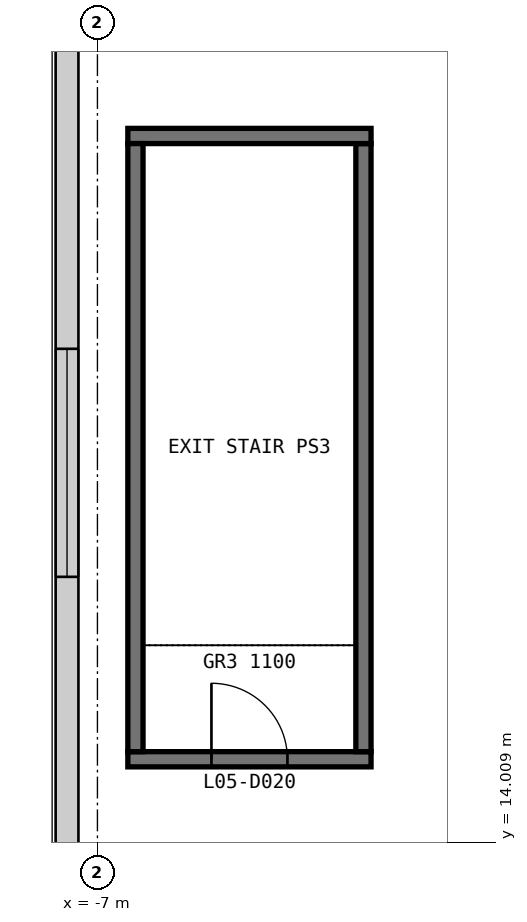
"""IFC4 building model, lengths in metres.
Left out: names, types, materials, properties, quantities, classifications, styles, units other than length and angle.
Written with IfcOpenShell. Run it as: python <this file> out.ifc"""

import sys

from ifc_helpers import new_model, si_unit, direction, frame, frame_2d, origin, place, context, subcontext, project, spatial, rectangle, extrude, element, fill, save


model = new_model("IFC4")
c1 = context("Model", 3, precision=1e-05, world=origin(), true_north=direction((0.0, 1.0)))
c2 = subcontext(c1, "Body", "Model", "MODEL_VIEW")
j1 = project(units=[si_unit("LENGTHUNIT", "METRE"), si_unit("PLANEANGLEUNIT", "RADIAN")], contexts=[c1])
p1 = place(None, origin())
s1 = spatial("IfcSite", under=j1, at=p1, CompositionType="ELEMENT")
p2 = place(p1, origin())
s2 = spatial("IfcBuilding", under=s1, at=p2, CompositionType="ELEMENT")
p3 = place(p2, frame((0.0, 0.0, 26.2)))
s3 = spatial("IfcBuildingStorey", under=s2, at=p3, CompositionType="ELEMENT", Elevation=26.2)
p4 = place(p3, frame((-7.4, 65.25, 0.0), z_axis=(0.0, 0.0, 1.0), x_axis=(0.0, -1.0, 0.0)))
e1 = element("IfcWall", 1, at=p4, inside=s3, PredefinedType="SOLIDWALL", context=c2, shape_type="SweptSolid", body=[
    extrude(rectangle(XDim=72.5, YDim=0.3, at=frame_2d((36.25, 0.0))), origin(), (0.0, 0.0, 1.0), 4.5),
])
p5 = place(p4, frame((66.75, 0.0, 0.9)))
e2 = element("IfcOpeningElement", 2, at=p5, cuts=e1, PredefinedType="OPENING", context=c2, shape_type="SweptSolid", body=[
    extrude(rectangle(XDim=3.0, YDim=2.4, at=frame_2d((1.5, 1.2))), frame((0.0, 0.16, 0.0), z_axis=(0.0, -1.0, 0.0), x_axis=(1.0, 0.0, 0.0)), (0.0, 0.0, 1.0), 0.32),
])
p6 = place(p4, frame((58.75, 0.0, 0.9)))
e3 = element("IfcOpeningElement", 3, at=p6, cuts=e1, PredefinedType="OPENING", context=c2, shape_type="SweptSolid", body=[
    extrude(rectangle(XDim=3.0, YDim=2.4, at=frame_2d((1.5, 1.2))), frame((0.0, 0.16, 0.0), z_axis=(0.0, -1.0, 0.0), x_axis=(1.0, 0.0, 0.0)), (0.0, 0.0, 1.0), 0.32),
])
p7 = place(p4, frame((44.75, 0.0, 0.9)))
e4 = element("IfcOpeningElement", 4, at=p7, cuts=e1, PredefinedType="OPENING", context=c2, shape_type="SweptSolid", body=[
    extrude(rectangle(XDim=3.0, YDim=2.4, at=frame_2d((1.5, 1.2))), frame((0.0, 0.16, 0.0), z_axis=(0.0, -1.0, 0.0), x_axis=(1.0, 0.0, 0.0)), (0.0, 0.0, 1.0), 0.32),
])
p8 = place(p4, frame((32.75, 0.0, 0.9)))
e5 = element("IfcOpeningElement", 5, at=p8, cuts=e1, PredefinedType="OPENING", context=c2, shape_type="SweptSolid", body=[
    extrude(rectangle(XDim=3.0, YDim=2.4, at=frame_2d((1.5, 1.2))), frame((0.0, 0.16, 0.0), z_axis=(0.0, -1.0, 0.0), x_axis=(1.0, 0.0, 0.0)), (0.0, 0.0, 1.0), 0.32),
])
p9 = place(p4, frame((24.25, 0.0, 0.9)))
e6 = element("IfcOpeningElement", 6, at=p9, cuts=e1, PredefinedType="OPENING", context=c2, shape_type="SweptSolid", body=[
    extrude(rectangle(XDim=3.0, YDim=2.4, at=frame_2d((1.5, 1.2))), frame((0.0, 0.16, 0.0), z_axis=(0.0, -1.0, 0.0), x_axis=(1.0, 0.0, 0.0)), (0.0, 0.0, 1.0), 0.32),
])
p10 = place(p4, frame((18.25, 0.0, 0.9)))
e7 = element("IfcOpeningElement", 7, at=p10, cuts=e1, PredefinedType="OPENING", context=c2, shape_type="SweptSolid", body=[
    extrude(rectangle(XDim=3.0, YDim=2.4, at=frame_2d((1.5, 1.2))), frame((0.0, 0.16, 0.0), z_axis=(0.0, -1.0, 0.0), x_axis=(1.0, 0.0, 0.0)), (0.0, 0.0, 1.0), 0.32),
])
p11 = place(p4, frame((10.75, 0.0, 0.9)))
e8 = element("IfcOpeningElement", 8, at=p11, cuts=e1, PredefinedType="OPENING", context=c2, shape_type="SweptSolid", body=[
    extrude(rectangle(XDim=3.0, YDim=2.4, at=frame_2d((1.5, 1.2))), frame((0.0, 0.16, 0.0), z_axis=(0.0, -1.0, 0.0), x_axis=(1.0, 0.0, 0.0)), (0.0, 0.0, 1.0), 0.32),
])
p12 = place(p4, frame((2.75, 0.0, 0.9)))
e9 = element("IfcOpeningElement", 9, at=p12, cuts=e1, PredefinedType="OPENING", context=c2, shape_type="SweptSolid", body=[
    extrude(rectangle(XDim=3.0, YDim=2.4, at=frame_2d((1.5, 1.2))), frame((0.0, 0.16, 0.0), z_axis=(0.0, -1.0, 0.0), x_axis=(1.0, 0.0, 0.0)), (0.0, 0.0, 1.0), 0.32),
])
p13 = place(p3, frame((-6.6, 15.1, 0.0), z_axis=(0.0, 0.0, 1.0), x_axis=(1.0, 0.0, 0.0)))
e10 = element("IfcWall", 10, at=p13, inside=s3, PredefinedType="SOLIDWALL", context=c2, shape_type="SweptSolid", body=[
    extrude(rectangle(XDim=3.2, YDim=0.2, at=frame_2d((1.6, 0.0))), origin(), (0.0, 0.0, 1.0), 4.8),
])
p14 = place(p13, frame((1.1, 0.0, 0.0)))
e11 = element("IfcOpeningElement", 11, at=p14, cuts=e10, PredefinedType="OPENING", context=c2, shape_type="SweptSolid", body=[
    extrude(rectangle(XDim=1.0, YDim=2.2, at=frame_2d((0.5, 1.1))), frame((0.0, 0.11, 0.0), z_axis=(0.0, -1.0, 0.0), x_axis=(1.0, 0.0, 0.0)), (0.0, 0.0, 1.0), 0.22),
])
p15 = place(p3, frame((-3.5, 15.2, 0.0), z_axis=(0.0, 0.0, 1.0), x_axis=(0.0, 1.0, 0.0)))
e12 = element("IfcWall", 12, at=p15, inside=s3, PredefinedType="SOLIDWALL", context=c2, shape_type="SweptSolid", body=[
    extrude(rectangle(XDim=8.0, YDim=0.2, at=frame_2d((4.0, 0.0))), origin(), (0.0, 0.0, 1.0), 4.8),
])
p16 = place(p3, frame((-3.4, 23.3, 0.0), z_axis=(0.0, 0.0, 1.0), x_axis=(-1.0, 0.0, 0.0)))
e13 = element("IfcWall", 13, at=p16, inside=s3, PredefinedType="SOLIDWALL", context=c2, shape_type="SweptSolid", body=[
    extrude(rectangle(XDim=3.2, YDim=0.2, at=frame_2d((1.6, 0.0))), origin(), (0.0, 0.0, 1.0), 4.8),
])
p17 = place(p3, frame((-6.5, 23.2, 0.0), z_axis=(0.0, 0.0, 1.0), x_axis=(0.0, -1.0, 0.0)))
e14 = element("IfcWall", 14, at=p17, inside=s3, PredefinedType="SOLIDWALL", context=c2, shape_type="SweptSolid", body=[
    extrude(rectangle(XDim=8.0, YDim=0.2, at=frame_2d((4.0, 0.0))), origin(), (0.0, 0.0, 1.0), 4.8),
])
p18 = place(p7, origin())
e15 = element("IfcWindow", 15, at=p18, inside=s3, PartitioningType="SINGLE_PANEL", PredefinedType="WINDOW", context=c2, shape_type="SweptSolid", body=[
    extrude(rectangle(XDim=3.0, YDim=2.4, at=frame_2d((1.5, 1.2))), frame((0.0, 0.03, 0.0), z_axis=(0.0, -1.0, 0.0), x_axis=(1.0, 0.0, 0.0)), (0.0, 0.0, 1.0), 0.06),
])
fill(e4, e15)
p19 = place(p14, origin())
e16 = element("IfcDoor", 16, at=p19, inside=s3, OperationType="SINGLE_SWING_LEFT", PredefinedType="DOOR", context=c2, shape_type="SweptSolid", body=[
    extrude(rectangle(XDim=1.0, YDim=2.2, at=frame_2d((0.5, 1.1))), frame((0.0, 0.025, 0.0), z_axis=(0.0, -1.0, 0.0), x_axis=(1.0, 0.0, 0.0)), (0.0, 0.0, 1.0), 0.05),
])
fill(e11, e16)
save(model, sys.argv[1])
